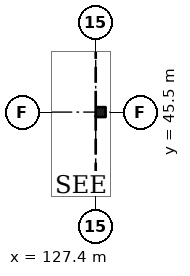
"""IFC4 building model, lengths in metres.
Left out: names, types, materials, properties, quantities, classifications, styles, units other than length and angle.
Written with IfcOpenShell. Run it as: python <this file> out.ifc"""

import sys

from ifc_helpers import new_model, si_unit, direction, frame, frame_2d, origin, origin_2d, place, context, subcontext, project, spatial, rectangle, extrude, element, save


model = new_model("IFC4")
c1 = context("Model", 3, precision=1e-05, world=origin(), true_north=direction((0.0, 1.0)))
c2 = subcontext(c1, "Body", "Model", "MODEL_VIEW")
j1 = project(units=[si_unit("LENGTHUNIT", "METRE"), si_unit("PLANEANGLEUNIT", "RADIAN")], contexts=[c1])
p1 = place(None, origin())
s1 = spatial("IfcSite", under=j1, at=p1, CompositionType="ELEMENT")
p2 = place(p1, origin())
s2 = spatial("IfcBuilding", under=s1, at=p2, CompositionType="ELEMENT")
p3 = place(p2, frame((0.0, 0.0, 6.37)))
s3 = spatial("IfcBuildingStorey", under=s2, at=p3, CompositionType="ELEMENT", Elevation=6.37)
p4 = place(p3, frame((127.725, 45.5, 0.0), z_axis=(0.0, 0.0, 1.0), x_axis=(1.0, 0.0, 0.0)))
e1 = element("IfcColumn", 1, at=p4, inside=s3, PredefinedType="COLUMN", context=c2, shape_type="SweptSolid", body=[
    extrude(rectangle(XDim=0.65, YDim=0.65, at=origin_2d()), origin(), (0.0, 0.0, 1.0), 4.55),
])
p5 = place(p3, frame((104.65, 40.75, 0.0), z_axis=(0.0, 0.0, 1.0), x_axis=(1.0, 0.0, 0.0)))
e2 = element("IfcWall", 2, at=p5, inside=s3, PredefinedType="SHEAR", context=c2, shape_type="SweptSolid", body=[
    extrude(rectangle(XDim=22.75, YDim=0.4, at=frame_2d((11.375, 0.0))), origin(), (0.0, 0.0, 1.0), 4.55),
])
save(model, sys.argv[1])
